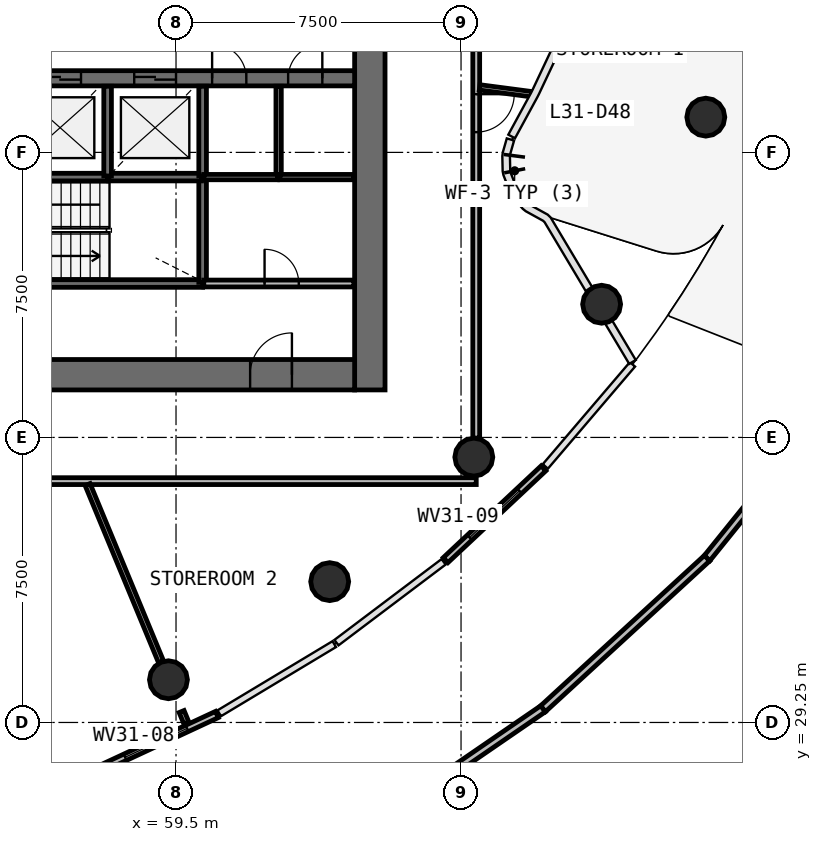
"""IFC4 building model, lengths in metres.
Left out: names, types, materials, properties, quantities, classifications, styles, units other than length and angle.
Written with IfcOpenShell. Run it as: python <this file> out.ifc"""

import sys

from ifc_helpers import new_model, si_unit, direction, frame, frame_2d, origin, origin_2d, place, context, subcontext, project, spatial, rectangle, circle, extrude, source, transform, mapped, element, fill, save


model = new_model("IFC4")
c1 = context("Model", 3, precision=1e-05, world=origin(), true_north=direction((0.0, 1.0)))
c2 = subcontext(c1, "Body", "Model", "MODEL_VIEW")
j1 = project(units=[si_unit("LENGTHUNIT", "METRE"), si_unit("PLANEANGLEUNIT", "RADIAN")], contexts=[c1])
p1 = place(None, origin())
s1 = spatial("IfcSite", under=j1, at=p1, CompositionType="ELEMENT")
p2 = place(p1, origin())
s2 = spatial("IfcBuilding", under=s1, at=p2, CompositionType="ELEMENT")
p3 = place(p2, frame((0.0, 0.0, 133.1)))
s3 = spatial("IfcBuildingStorey", under=s2, at=p3, CompositionType="ELEMENT", Elevation=133.1)
p4 = place(p3, frame((64.6, 38.0, 0.0), z_axis=(0.0, 0.0, 1.0), x_axis=(0.0, 1.0, 0.0)))
e1 = element("IfcWall", 1, at=p4, inside=s3, PredefinedType="SHEAR", context=c2, shape_type="SweptSolid", body=[
    extrude(rectangle(XDim=20.0, YDim=0.8, at=frame_2d((10.0, 0.0))), origin(), (0.0, 0.0, 1.0), 3.9),
])
p5 = place(p4, frame((9.1, 0.0, 0.0)))
e2 = element("IfcOpeningElement", 2, at=p5, cuts=e1, PredefinedType="OPENING", context=c2, shape_type="SweptSolid", body=[
    extrude(rectangle(XDim=1.8, YDim=2.1, at=frame_2d((0.9, 1.05))), frame((0.0, 0.41, 0.0), z_axis=(0.0, -1.0, 0.0), x_axis=(1.0, 0.0, 0.0)), (0.0, 0.0, 1.0), 0.82),
])
p6 = place(p3, frame((39.8, 38.4, 0.0), z_axis=(0.0, 0.0, 1.0), x_axis=(1.0, 0.0, 0.0)))
e3 = element("IfcWall", 3, at=p6, inside=s3, PredefinedType="SHEAR", context=c2, shape_type="SweptSolid", body=[
    extrude(rectangle(XDim=24.4, YDim=0.8, at=frame_2d((12.2, 0.0))), origin(), (0.0, 0.0, 1.0), 3.9),
])
p7 = place(p6, frame((21.65, 0.0, 0.0)))
e4 = element("IfcOpeningElement", 4, at=p7, cuts=e3, PredefinedType="OPENING", context=c2, shape_type="SweptSolid", body=[
    extrude(rectangle(XDim=1.1, YDim=2.1, at=frame_2d((0.55, 1.05))), frame((0.0, 0.41, 0.0), z_axis=(0.0, -1.0, 0.0), x_axis=(1.0, 0.0, 0.0)), (0.0, 0.0, 1.0), 0.82),
])
p8 = place(p6, frame((2.15, 0.0, 0.0)))
e5 = element("IfcOpeningElement", 5, at=p8, cuts=e3, PredefinedType="OPENING", context=c2, shape_type="SweptSolid", body=[
    extrude(rectangle(XDim=1.1, YDim=2.1, at=frame_2d((0.55, 1.05))), frame((0.0, 0.41, 0.0), z_axis=(0.0, -1.0, 0.0), x_axis=(1.0, 0.0, 0.0)), (0.0, 0.0, 1.0), 0.82),
])
p9 = place(p3, frame((39.8, 46.2, 0.0), z_axis=(0.0, 0.0, 1.0), x_axis=(1.0, 0.0, 0.0)))
e6 = element("IfcWall", 6, at=p9, inside=s3, PredefinedType="SHEAR", context=c2, shape_type="SweptSolid", body=[
    extrude(rectangle(XDim=24.4, YDim=0.4, at=frame_2d((12.2, 0.0))), origin(), (0.0, 0.0, 1.0), 3.9),
])
p10 = place(p9, frame((13.6, 0.0, 0.0)))
e7 = element("IfcOpeningElement", 7, at=p10, cuts=e6, PredefinedType="OPENING", context=c2, shape_type="SweptSolid", body=[
    extrude(rectangle(XDim=1.1, YDim=2.1, at=frame_2d((0.55, 1.05))), frame((0.0, 0.21, 0.0), z_axis=(0.0, -1.0, 0.0), x_axis=(1.0, 0.0, 0.0)), (0.0, 0.0, 1.0), 0.42),
])
p11 = place(p9, frame((16.1, 0.0, 0.0)))
e8 = element("IfcOpeningElement", 8, at=p11, cuts=e6, PredefinedType="OPENING", context=c2, shape_type="SweptSolid", body=[
    extrude(rectangle(XDim=1.1, YDim=2.1, at=frame_2d((0.55, 1.05))), frame((0.0, 0.21, 0.0), z_axis=(0.0, -1.0, 0.0), x_axis=(1.0, 0.0, 0.0)), (0.0, 0.0, 1.0), 0.42),
])
p12 = place(p9, frame((18.6, 0.0, 0.0)))
e9 = element("IfcOpeningElement", 9, at=p12, cuts=e6, PredefinedType="OPENING", context=c2, shape_type="SweptSolid", body=[
    extrude(rectangle(XDim=1.1, YDim=2.1, at=frame_2d((0.55, 1.05))), frame((0.0, 0.21, 0.0), z_axis=(0.0, -1.0, 0.0), x_axis=(1.0, 0.0, 0.0)), (0.0, 0.0, 1.0), 0.42),
])
p13 = place(p9, frame((4.7, 0.0, 0.0)))
e10 = element("IfcOpeningElement", 10, at=p13, cuts=e6, PredefinedType="OPENING", context=c2, shape_type="SweptSolid", body=[
    extrude(rectangle(XDim=1.1, YDim=2.1, at=frame_2d((0.55, 1.05))), frame((0.0, 0.21, 0.0), z_axis=(0.0, -1.0, 0.0), x_axis=(1.0, 0.0, 0.0)), (0.0, 0.0, 1.0), 0.42),
])
p14 = place(p9, frame((7.2, 0.0, 0.0)))
e11 = element("IfcOpeningElement", 11, at=p14, cuts=e6, PredefinedType="OPENING", context=c2, shape_type="SweptSolid", body=[
    extrude(rectangle(XDim=1.1, YDim=2.1, at=frame_2d((0.55, 1.05))), frame((0.0, 0.21, 0.0), z_axis=(0.0, -1.0, 0.0), x_axis=(1.0, 0.0, 0.0)), (0.0, 0.0, 1.0), 0.42),
])
p15 = place(p9, frame((9.7, 0.0, 0.0)))
e12 = element("IfcOpeningElement", 12, at=p15, cuts=e6, PredefinedType="OPENING", context=c2, shape_type="SweptSolid", body=[
    extrude(rectangle(XDim=1.1, YDim=2.1, at=frame_2d((0.55, 1.05))), frame((0.0, 0.21, 0.0), z_axis=(0.0, -1.0, 0.0), x_axis=(1.0, 0.0, 0.0)), (0.0, 0.0, 1.0), 0.42),
])
p16 = place(p9, frame((20.65, 0.0, 0.0)))
e13 = element("IfcOpeningElement", 13, at=p16, cuts=e6, PredefinedType="OPENING", context=c2, shape_type="SweptSolid", body=[
    extrude(rectangle(XDim=0.9, YDim=2.1, at=frame_2d((0.45, 1.05))), frame((0.0, 0.21, 0.0), z_axis=(0.0, -1.0, 0.0), x_axis=(1.0, 0.0, 0.0)), (0.0, 0.0, 1.0), 0.42),
])
p17 = place(p9, frame((22.65, 0.0, 0.0)))
e14 = element("IfcOpeningElement", 14, at=p17, cuts=e6, PredefinedType="OPENING", context=c2, shape_type="SweptSolid", body=[
    extrude(rectangle(XDim=0.9, YDim=2.1, at=frame_2d((0.45, 1.05))), frame((0.0, 0.21, 0.0), z_axis=(0.0, -1.0, 0.0), x_axis=(1.0, 0.0, 0.0)), (0.0, 0.0, 1.0), 0.42),
])
p18 = place(p9, frame((0.85, 0.0, 0.0)))
e15 = element("IfcOpeningElement", 15, at=p18, cuts=e6, PredefinedType="OPENING", context=c2, shape_type="SweptSolid", body=[
    extrude(rectangle(XDim=0.9, YDim=2.1, at=frame_2d((0.45, 1.05))), frame((0.0, 0.21, 0.0), z_axis=(0.0, -1.0, 0.0), x_axis=(1.0, 0.0, 0.0)), (0.0, 0.0, 1.0), 0.42),
])
p19 = place(p9, frame((2.85, 0.0, 0.0)))
e16 = element("IfcOpeningElement", 16, at=p19, cuts=e6, PredefinedType="OPENING", context=c2, shape_type="SweptSolid", body=[
    extrude(rectangle(XDim=0.9, YDim=2.1, at=frame_2d((0.45, 1.05))), frame((0.0, 0.21, 0.0), z_axis=(0.0, -1.0, 0.0), x_axis=(1.0, 0.0, 0.0)), (0.0, 0.0, 1.0), 0.42),
])
p20 = place(p9, frame((11.85, 0.0, 0.0)))
e17 = element("IfcOpeningElement", 17, at=p20, cuts=e6, PredefinedType="OPENING", context=c2, shape_type="SweptSolid", body=[
    extrude(rectangle(XDim=0.9, YDim=2.1, at=frame_2d((0.45, 1.05))), frame((0.0, 0.21, 0.0), z_axis=(0.0, -1.0, 0.0), x_axis=(1.0, 0.0, 0.0)), (0.0, 0.0, 1.0), 0.42),
])
m1 = source(origin(), c2, "Body", "SweptSolid", [
    extrude(circle(Radius=0.5, at=origin_2d()), origin(), (0.0, 0.0, 1.0), 4.22),
])
for number, where, z_axis, x_axis in (
    (18, (59.301, 30.374, -0.32), (0.0, 0.0, 1.0), (1.0, 0.0, 0.0)),
    (19, (63.544, 32.956, -0.32), (0.0, 0.0, 1.0), (1.0, 0.0, 0.0)),
    (20, (67.336, 36.232, -0.32), (0.0, 0.0, 1.0), (1.0, 0.0, 0.0)),
    (21, (70.699, 40.254, -0.32), (0.0, 0.0, 1.0), (1.0, 0.0, 0.0)),
    (22, (73.441, 45.177, -0.32), (0.0, 0.0, 1.0), (1.0, 0.0, 0.0)),
):
    element("IfcColumn", number, at=place(p3, frame(where, z_axis=z_axis, x_axis=x_axis)), inside=s3, PredefinedType="COLUMN", context=c2, shape_type="MappedRepresentation", body=[
        mapped(m1, transform((0.0, 0.0, 0.0), scale=1.0)),
    ])
p21 = place(p3, frame((57.375, 27.969, 0.0), z_axis=(0.0, 0.0, 1.0), x_axis=(0.906604865337, 0.421980589776, 0.0)))
e23 = element("IfcWall", 23, at=p21, inside=s3, PredefinedType="STANDARD", context=c2, shape_type="SweptSolid", body=[
    extrude(rectangle(XDim=3.531, YDim=0.18, at=frame_2d((1.766, 0.0))), origin(), (0.0, 0.0, 1.0), 3.58),
])
p22 = place(p21, frame((0.865, 0.0, 0.9)))
e24 = element("IfcOpeningElement", 24, at=p22, cuts=e23, PredefinedType="OPENING", context=c2, shape_type="SweptSolid", body=[
    extrude(rectangle(XDim=1.8, YDim=2.1, at=frame_2d((0.9, 1.05))), frame((0.0, 0.1, 0.0), z_axis=(0.0, -1.0, 0.0), x_axis=(1.0, 0.0, 0.0)), (0.0, 0.0, 1.0), 0.2),
])
p23 = place(p3, frame((66.594, 33.522, 0.0), z_axis=(0.0, 0.0, 1.0), x_axis=(0.729623450538, 0.683849121097, 0.0)))
e25 = element("IfcWall", 25, at=p23, inside=s3, PredefinedType="STANDARD", context=c2, shape_type="SweptSolid", body=[
    extrude(rectangle(XDim=3.531, YDim=0.18, at=frame_2d((1.765, 0.0))), origin(), (0.0, 0.0, 1.0), 3.58),
])
p24 = place(p23, frame((0.865, 0.0, 0.9)))
e26 = element("IfcOpeningElement", 26, at=p24, cuts=e25, PredefinedType="OPENING", context=c2, shape_type="SweptSolid", body=[
    extrude(rectangle(XDim=1.8, YDim=2.1, at=frame_2d((0.9, 1.05))), frame((0.0, 0.1, 0.0), z_axis=(0.0, -1.0, 0.0), x_axis=(1.0, 0.0, 0.0)), (0.0, 0.0, 1.0), 0.2),
])
p25 = place(p3, frame((77.153, 38.131, 0.0), z_axis=(0.0, 0.0, 1.0), x_axis=(-0.628118866057, -0.778117401234, 0.0)))
e27 = element("IfcWall", 27, at=p25, inside=s3, PredefinedType="PARAPET", context=c2, shape_type="SweptSolid", body=[
    extrude(rectangle(XDim=5.859, YDim=0.2, at=frame_2d((2.93, 0.0))), origin(), (0.0, 0.0, 1.0), 1.1),
])
p26 = place(p3, frame((73.473, 33.572, 0.0), z_axis=(0.0, 0.0, 1.0), x_axis=(-0.736607402207, -0.676320585975, 0.0)))
e28 = element("IfcWall", 28, at=p26, inside=s3, PredefinedType="PARAPET", context=c2, shape_type="SweptSolid", body=[
    extrude(rectangle(XDim=5.86, YDim=0.2, at=frame_2d((2.93, 0.0))), origin(), (0.0, 0.0, 1.0), 1.1),
])
p27 = place(p3, frame((69.156, 29.609, 0.0), z_axis=(0.0, 0.0, 1.0), x_axis=(-0.824488962641, -0.565878034989, 0.0)))
e29 = element("IfcWall", 29, at=p27, inside=s3, PredefinedType="PARAPET", context=c2, shape_type="SweptSolid", body=[
    extrude(rectangle(XDim=5.861, YDim=0.2, at=frame_2d((2.93, 0.0))), origin(), (0.0, 0.0, 1.0), 1.1),
])
p28 = place(p3, frame((53.6, 40.8, 0.0), z_axis=(0.0, 0.0, 1.0), x_axis=(1.0, 0.0, 0.0)))
e30 = element("IfcWall", 30, at=p28, inside=s3, PredefinedType="SOLIDWALL", context=c2, shape_type="SweptSolid", body=[
    extrude(rectangle(XDim=6.6, YDim=0.2, at=frame_2d((3.3, 0.0))), origin(), (0.0, 0.0, 1.0), 3.58),
])
p29 = place(p28, frame((0.3, 0.0, 0.0)))
e31 = element("IfcOpeningElement", 31, at=p29, cuts=e30, PredefinedType="OPENING", context=c2, shape_type="SweptSolid", body=[
    extrude(rectangle(XDim=1.2, YDim=2.1, at=frame_2d((0.6, 1.05))), frame((0.0, 0.11, 0.0), z_axis=(0.0, -1.0, 0.0), x_axis=(1.0, 0.0, 0.0)), (0.0, 0.0, 1.0), 0.22),
])
p30 = place(p3, frame((60.2, 40.83, 0.0), z_axis=(0.0, 0.0, 1.0), x_axis=(0.0, 1.0, 0.0)))
e32 = element("IfcWall", 32, at=p30, inside=s3, PredefinedType="SOLIDWALL", context=c2, shape_type="SweptSolid", body=[
    extrude(rectangle(XDim=2.77, YDim=0.2, at=frame_2d((1.385, 0.0))), origin(), (0.0, 0.0, 1.0), 3.58),
])
p31 = place(p3, frame((55.2, 43.6, 0.0), z_axis=(0.0, 0.0, 1.0), x_axis=(1.0, 0.0, 0.0)))
e33 = element("IfcWall", 33, at=p31, inside=s3, PredefinedType="SOLIDWALL", context=c2, shape_type="SweptSolid", body=[
    extrude(rectangle(XDim=2.5, YDim=0.2, at=frame_2d((1.25, 0.0))), origin(), (0.0, 0.0, 1.0), 3.58),
])
p32 = place(p3, frame((57.73, 43.6, 0.0), z_axis=(0.0, 0.0, 1.0), x_axis=(1.0, 0.0, 0.0)))
e34 = element("IfcWall", 34, at=p32, inside=s3, PredefinedType="SOLIDWALL", context=c2, shape_type="SweptSolid", body=[
    extrude(rectangle(XDim=2.44, YDim=0.2, at=frame_2d((1.22, 0.0))), origin(), (0.0, 0.0, 1.0), 3.58),
])
for number, where, z_axis, x_axis in (
    (35, (57.7, 43.63, 0.0), (0.0, 0.0, 1.0), (0.0, 1.0, 0.0)),
    (36, (60.2, 43.63, 0.0), (0.0, 0.0, 1.0), (0.0, 1.0, 0.0)),
):
    element("IfcWall", number, at=place(p3, frame(where, z_axis=z_axis, x_axis=x_axis)), inside=s3, PredefinedType="SOLIDWALL", context=c2, shape_type="SweptSolid", body=[
        extrude(rectangle(XDim=2.36, YDim=0.2, at=frame_2d((1.18, 0.0))), origin(), (0.0, 0.0, 1.0), 3.58),
    ])
p33 = place(p3, frame((67.4, 35.6, 0.0), z_axis=(0.0, 0.0, 1.0), x_axis=(-1.0, 0.0, 0.0)))
e37 = element("IfcWall", 37, at=p33, inside=s3, PredefinedType="PARTITIONING", context=c2, shape_type="SweptSolid", body=[
    extrude(rectangle(XDim=30.8, YDim=0.18, at=frame_2d((15.4, 0.0))), origin(), (0.0, 0.0, 1.0), 2.88),
])
p34 = place(p33, frame((14.95, 0.0, 0.0)))
e38 = element("IfcOpeningElement", 38, at=p34, cuts=e37, PredefinedType="OPENING", context=c2, shape_type="SweptSolid", body=[
    extrude(rectangle(XDim=1.0, YDim=2.1, at=frame_2d((0.5, 1.05))), frame((0.0, 0.1, 0.0), z_axis=(0.0, -1.0, 0.0), x_axis=(1.0, 0.0, 0.0)), (0.0, 0.0, 1.0), 0.2),
])
p35 = place(p33, frame((12.55, 0.0, 0.0)))
e39 = element("IfcOpeningElement", 39, at=p35, cuts=e37, PredefinedType="OPENING", context=c2, shape_type="SweptSolid", body=[
    extrude(rectangle(XDim=1.0, YDim=2.1, at=frame_2d((0.5, 1.05))), frame((0.0, 0.1, 0.0), z_axis=(0.0, -1.0, 0.0), x_axis=(1.0, 0.0, 0.0)), (0.0, 0.0, 1.0), 0.2),
])
p36 = place(p3, frame((67.4, 60.37, 0.0), z_axis=(0.0, 0.0, 1.0), x_axis=(0.0, -1.0, 0.0)))
e40 = element("IfcWall", 40, at=p36, inside=s3, PredefinedType="PARTITIONING", context=c2, shape_type="SweptSolid", body=[
    extrude(rectangle(XDim=23.638, YDim=0.18, at=frame_2d((11.819, 0.0))), origin(), (0.0, 0.0, 1.0), 2.88),
])
p37 = place(p36, frame((8.988, 0.0, 0.0)))
e41 = element("IfcOpeningElement", 41, at=p37, cuts=e40, PredefinedType="OPENING", context=c2, shape_type="SweptSolid", body=[
    extrude(rectangle(XDim=1.0, YDim=2.1, at=frame_2d((0.5, 1.05))), frame((0.0, 0.1, 0.0), z_axis=(0.0, -1.0, 0.0), x_axis=(1.0, 0.0, 0.0)), (0.0, 0.0, 1.0), 0.2),
])
p38 = place(p36, frame((14.587, 0.0, 0.0)))
e42 = element("IfcOpeningElement", 42, at=p38, cuts=e40, PredefinedType="OPENING", context=c2, shape_type="SweptSolid", body=[
    extrude(rectangle(XDim=1.0, YDim=2.1, at=frame_2d((0.5, 1.05))), frame((0.0, 0.1, 0.0), z_axis=(0.0, -1.0, 0.0), x_axis=(1.0, 0.0, 0.0)), (0.0, 0.0, 1.0), 0.2),
])
p39 = place(p36, frame((11.387, 0.0, 0.0)))
e43 = element("IfcOpeningElement", 43, at=p39, cuts=e40, PredefinedType="OPENING", context=c2, shape_type="SweptSolid", body=[
    extrude(rectangle(XDim=1.0, YDim=2.1, at=frame_2d((0.5, 1.05))), frame((0.0, 0.1, 0.0), z_axis=(0.0, -1.0, 0.0), x_axis=(1.0, 0.0, 0.0)), (0.0, 0.0, 1.0), 0.2),
])
p40 = place(p3, frame((60.23, 40.8, 0.0), z_axis=(0.0, 0.0, 1.0), x_axis=(1.0, 0.0, 0.0)))
e44 = element("IfcWall", 44, at=p40, inside=s3, PredefinedType="PARTITIONING", context=c2, shape_type="SweptSolid", body=[
    extrude(rectangle(XDim=3.95, YDim=0.18, at=frame_2d((1.975, 0.0))), origin(), (0.0, 0.0, 1.0), 3.58),
])
p41 = place(p40, frame((1.6, 0.0, 0.0)))
e45 = element("IfcOpeningElement", 45, at=p41, cuts=e44, PredefinedType="OPENING", context=c2, shape_type="SweptSolid", body=[
    extrude(rectangle(XDim=0.9, YDim=2.1, at=frame_2d((0.45, 1.05))), frame((0.0, 0.1, 0.0), z_axis=(0.0, -1.0, 0.0), x_axis=(1.0, 0.0, 0.0)), (0.0, 0.0, 1.0), 0.2),
])
p42 = place(p3, frame((57.174, 35.51, 0.0), z_axis=(0.0, 0.0, 1.0), x_axis=(0.382690261322, -0.923876703835, 0.0)))
e46 = element("IfcWall", 46, at=p42, inside=s3, PredefinedType="PARTITIONING", context=c2, shape_type="SweptSolid", body=[
    extrude(rectangle(XDim=5.054, YDim=0.14, at=frame_2d((2.527, 0.0))), origin(), (0.0, 0.0, 1.0), 2.88),
])
p43 = place(p3, frame((62.2, 43.6, 0.0), z_axis=(0.0, 0.0, 1.0), x_axis=(0.0, 1.0, 0.0)))
e47 = element("IfcWall", 47, at=p43, inside=s3, PredefinedType="PARTITIONING", context=c2, shape_type="SweptSolid", body=[
    extrude(rectangle(XDim=2.39, YDim=0.14, at=frame_2d((1.195, 0.0))), origin(), (0.0, 0.0, 1.0), 2.88),
])
p44 = place(p3, frame((60.23, 43.6, 0.0), z_axis=(0.0, 0.0, 1.0), x_axis=(1.0, 0.0, 0.0)))
e48 = element("IfcWall", 48, at=p44, inside=s3, PredefinedType="PARTITIONING", context=c2, shape_type="SweptSolid", body=[
    extrude(rectangle(XDim=1.94, YDim=0.14, at=frame_2d((0.97, 0.0))), origin(), (0.0, 0.0, 1.0), 2.88),
])
p45 = place(p3, frame((62.23, 43.6, 0.0), z_axis=(0.0, 0.0, 1.0), x_axis=(1.0, 0.0, 0.0)))
e49 = element("IfcWall", 49, at=p45, inside=s3, PredefinedType="PARTITIONING", context=c2, shape_type="SweptSolid", body=[
    extrude(rectangle(XDim=1.95, YDim=0.14, at=frame_2d((0.975, 0.0))), origin(), (0.0, 0.0, 1.0), 2.88),
])
p46 = place(p3, frame((67.49, 45.961, 0.0), z_axis=(0.0, 0.0, 1.0), x_axis=(0.991453697095, -0.130459060692, 0.0)))
e50 = element("IfcWall", 50, at=p46, inside=s3, PredefinedType="PARTITIONING", context=c2, shape_type="SweptSolid", body=[
    extrude(rectangle(XDim=1.389, YDim=0.14, at=frame_2d((0.694, 0.0))), origin(), (0.0, 0.0, 1.0), 2.88),
])
p47 = place(p3, frame((59.647, 29.538, 0.0), z_axis=(0.0, 0.0, 1.0), x_axis=(0.38265863017, -0.923889805527, 0.0)))
e51 = element("IfcWall", 51, at=p47, inside=s3, PredefinedType="PARTITIONING", context=c2, shape_type="SweptSolid", body=[
    extrude(rectangle(XDim=0.328, YDim=0.14, at=frame_2d((0.164, 0.0))), origin(), (0.0, 0.0, 1.0), 2.88),
])
m2 = source(origin(), c2, "Body", "SweptSolid", [
    extrude(rectangle(XDim=1.8, YDim=2.1, at=frame_2d((0.9, 1.05))), frame((0.0, 0.03, 0.0), z_axis=(0.0, -1.0, 0.0), x_axis=(1.0, 0.0, 0.0)), (0.0, 0.0, 1.0), 0.06),
])
p48 = place(p22, origin())
e52 = element("IfcWindow", 52, at=p48, inside=s3, PartitioningType="SINGLE_PANEL", PredefinedType="WINDOW", context=c2, shape_type="MappedRepresentation", body=[
    mapped(m2, transform((0.0, 0.0, 0.0), scale=1.0)),
])
fill(e24, e52)
p49 = place(p24, origin())
e53 = element("IfcWindow", 53, at=p49, inside=s3, PartitioningType="SINGLE_PANEL", PredefinedType="WINDOW", context=c2, shape_type="MappedRepresentation", body=[
    mapped(m2, transform((0.0, 0.0, 0.0), scale=1.0)),
])
fill(e26, e53)
m3 = source(origin(), c2, "Body", "SweptSolid", [
    extrude(rectangle(XDim=1.1, YDim=2.1, at=frame_2d((0.55, 1.05))), frame((0.0, 0.025, 0.0), z_axis=(0.0, -1.0, 0.0), x_axis=(1.0, 0.0, 0.0)), (0.0, 0.0, 1.0), 0.05),
])
p50 = place(p11, origin())
e54 = element("IfcDoor", 54, at=p50, inside=s3, OperationType="DOUBLE_DOOR_SLIDING", PredefinedType="USERDEFINED", context=c2, shape_type="MappedRepresentation", body=[
    mapped(m3, transform((0.0, 0.0, 0.0), scale=1.0)),
])
fill(e8, e54)
p51 = place(p12, origin())
e55 = element("IfcDoor", 55, at=p51, inside=s3, OperationType="DOUBLE_DOOR_SLIDING", PredefinedType="USERDEFINED", context=c2, shape_type="MappedRepresentation", body=[
    mapped(m3, transform((0.0, 0.0, 0.0), scale=1.0)),
])
fill(e9, e55)
m4 = source(origin(), c2, "Body", "SweptSolid", [
    extrude(rectangle(XDim=1.1, YDim=2.1, at=frame_2d((0.55, 1.05))), frame((0.0, 0.025, 0.0), z_axis=(0.0, -1.0, 0.0), x_axis=(1.0, 0.0, 0.0)), (0.0, 0.0, 1.0), 0.05),
])
p52 = place(p7, origin())
e56 = element("IfcDoor", 56, at=p52, inside=s3, OperationType="SINGLE_SWING_RIGHT", PredefinedType="DOOR", context=c2, shape_type="MappedRepresentation", body=[
    mapped(m4, transform((0.0, 0.0, 0.0), scale=1.0)),
])
fill(e4, e56)
m5 = source(origin(), c2, "Body", "SweptSolid", [
    extrude(rectangle(XDim=1.0, YDim=2.1, at=frame_2d((0.5, 1.05))), frame((0.0, 0.025, 0.0), z_axis=(0.0, -1.0, 0.0), x_axis=(1.0, 0.0, 0.0)), (0.0, 0.0, 1.0), 0.05),
])
p53 = place(p38, origin())
e57 = element("IfcDoor", 57, at=p53, inside=s3, OperationType="SINGLE_SWING_LEFT", PredefinedType="DOOR", context=c2, shape_type="MappedRepresentation", body=[
    mapped(m5, transform((0.0, 0.0, 0.0), scale=1.0)),
])
fill(e42, e57)
m6 = source(origin(), c2, "Body", "SweptSolid", [
    extrude(rectangle(XDim=0.9, YDim=2.1, at=frame_2d((0.45, 1.05))), frame((0.0, 0.025, 0.0), z_axis=(0.0, -1.0, 0.0), x_axis=(1.0, 0.0, 0.0)), (0.0, 0.0, 1.0), 0.05),
])
p54 = place(p16, origin())
e58 = element("IfcDoor", 58, at=p54, inside=s3, OperationType="SINGLE_SWING_LEFT", PredefinedType="DOOR", context=c2, shape_type="MappedRepresentation", body=[
    mapped(m6, transform((0.0, 0.0, 0.0), scale=1.0)),
])
fill(e13, e58)
p55 = place(p17, origin())
e59 = element("IfcDoor", 59, at=p55, inside=s3, OperationType="SINGLE_SWING_RIGHT", PredefinedType="DOOR", context=c2, shape_type="MappedRepresentation", body=[
    mapped(m6, transform((0.0, 0.0, 0.0), scale=1.0)),
])
fill(e14, e59)
p56 = place(p41, origin())
e60 = element("IfcDoor", 60, at=p56, inside=s3, OperationType="SINGLE_SWING_LEFT", PredefinedType="DOOR", context=c2, shape_type="MappedRepresentation", body=[
    mapped(m6, transform((0.0, 0.0, 0.0), scale=1.0)),
])
fill(e45, e60)
save(model, sys.argv[1])
